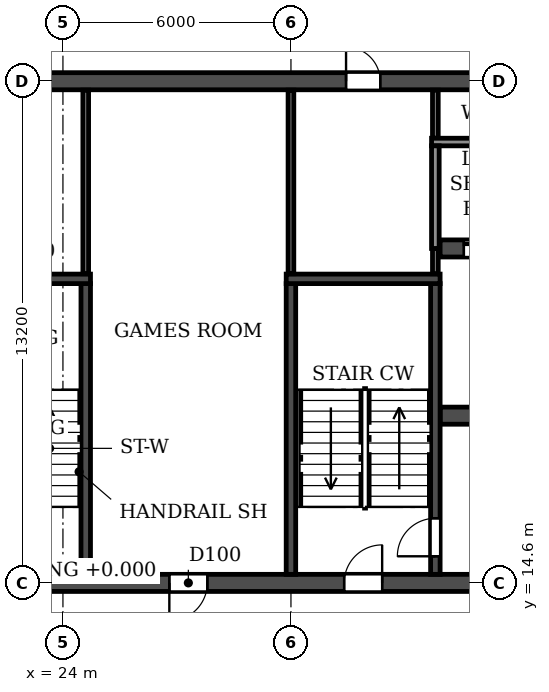
"""IFC4 building model, lengths in metres.
Left out: names, types, materials, properties, quantities, classifications, styles, units other than length and angle.
Written with IfcOpenShell. Run it as: python <this file> out.ifc"""

import sys

from ifc_helpers import new_model, si_unit, direction, frame, frame_2d, origin, place, context, subcontext, project, spatial, rectangle, extrude, element, fill, save


model = new_model("IFC4")
c1 = context("Model", 3, precision=1e-05, world=origin(), true_north=direction((0.0, 1.0)))
c2 = subcontext(c1, "Body", "Model", "MODEL_VIEW")
j1 = project(units=[si_unit("LENGTHUNIT", "METRE"), si_unit("PLANEANGLEUNIT", "RADIAN")], contexts=[c1])
p1 = place(None, origin())
s1 = spatial("IfcSite", under=j1, at=p1, CompositionType="ELEMENT")
p2 = place(p1, origin())
s2 = spatial("IfcBuilding", under=s1, at=p2, CompositionType="ELEMENT")
p3 = place(p2, frame((0.0, 0.0, 142.2)))
s3 = spatial("IfcBuildingStorey", under=s2, at=p3, CompositionType="ELEMENT", Elevation=142.2)
p4 = place(p3, frame((12.2, 14.6, 0.0), z_axis=(0.0, 0.0, 1.0), x_axis=(1.0, 0.0, 0.0)))
e1 = element("IfcWall", 1, at=p4, inside=s3, PredefinedType="SOLIDWALL", context=c2, shape_type="SweptSolid", body=[
    extrude(rectangle(XDim=77.6, YDim=0.45, at=frame_2d((38.8, 0.0))), origin(), (0.0, 0.0, 1.0), 3.07),
])
p5 = place(p4, frame((0.8, 0.0, 0.0)))
e2 = element("IfcOpeningElement", 2, at=p5, cuts=e1, PredefinedType="OPENING", context=c2, shape_type="SweptSolid", body=[
    extrude(rectangle(XDim=1.0, YDim=2.1, at=frame_2d((0.5, 1.05))), frame((0.0, 0.235, 0.0), z_axis=(0.0, -1.0, 0.0), x_axis=(1.0, 0.0, 0.0)), (0.0, 0.0, 1.0), 0.47),
])
p6 = place(p4, frame((3.8, 0.0, 0.0)))
e3 = element("IfcOpeningElement", 3, at=p6, cuts=e1, PredefinedType="OPENING", context=c2, shape_type="SweptSolid", body=[
    extrude(rectangle(XDim=1.0, YDim=2.1, at=frame_2d((0.5, 1.05))), frame((0.0, 0.235, 0.0), z_axis=(0.0, -1.0, 0.0), x_axis=(1.0, 0.0, 0.0)), (0.0, 0.0, 1.0), 0.47),
])
p7 = place(p4, frame((6.7, 0.0, 0.0)))
e4 = element("IfcOpeningElement", 4, at=p7, cuts=e1, PredefinedType="OPENING", context=c2, shape_type="SweptSolid", body=[
    extrude(rectangle(XDim=1.0, YDim=2.1, at=frame_2d((0.5, 1.05))), frame((0.0, 0.235, 0.0), z_axis=(0.0, -1.0, 0.0), x_axis=(1.0, 0.0, 0.0)), (0.0, 0.0, 1.0), 0.47),
])
p8 = place(p4, frame((14.6, 0.0, 0.0)))
e5 = element("IfcOpeningElement", 5, at=p8, cuts=e1, PredefinedType="OPENING", context=c2, shape_type="SweptSolid", body=[
    extrude(rectangle(XDim=1.0, YDim=2.1, at=frame_2d((0.5, 1.05))), frame((0.0, 0.235, 0.0), z_axis=(0.0, -1.0, 0.0), x_axis=(1.0, 0.0, 0.0)), (0.0, 0.0, 1.0), 0.47),
])
p9 = place(p4, frame((19.2, 0.0, 0.0)))
e6 = element("IfcOpeningElement", 6, at=p9, cuts=e1, PredefinedType="OPENING", context=c2, shape_type="SweptSolid", body=[
    extrude(rectangle(XDim=1.0, YDim=2.1, at=frame_2d((0.5, 1.05))), frame((0.0, 0.235, 0.0), z_axis=(0.0, -1.0, 0.0), x_axis=(1.0, 0.0, 0.0)), (0.0, 0.0, 1.0), 0.47),
])
p10 = place(p4, frame((33.1, 0.0, 0.0)))
e7 = element("IfcOpeningElement", 7, at=p10, cuts=e1, PredefinedType="OPENING", context=c2, shape_type="SweptSolid", body=[
    extrude(rectangle(XDim=1.0, YDim=2.1, at=frame_2d((0.5, 1.05))), frame((0.0, 0.235, 0.0), z_axis=(0.0, -1.0, 0.0), x_axis=(1.0, 0.0, 0.0)), (0.0, 0.0, 1.0), 0.47),
])
p11 = place(p4, frame((38.3, 0.0, 0.0)))
e8 = element("IfcOpeningElement", 8, at=p11, cuts=e1, PredefinedType="OPENING", context=c2, shape_type="SweptSolid", body=[
    extrude(rectangle(XDim=1.0, YDim=2.1, at=frame_2d((0.5, 1.05))), frame((0.0, 0.235, 0.0), z_axis=(0.0, -1.0, 0.0), x_axis=(1.0, 0.0, 0.0)), (0.0, 0.0, 1.0), 0.47),
])
p12 = place(p4, frame((40.9, 0.0, 0.0)))
e9 = element("IfcOpeningElement", 9, at=p12, cuts=e1, PredefinedType="OPENING", context=c2, shape_type="SweptSolid", body=[
    extrude(rectangle(XDim=1.0, YDim=2.1, at=frame_2d((0.5, 1.05))), frame((0.0, 0.235, 0.0), z_axis=(0.0, -1.0, 0.0), x_axis=(1.0, 0.0, 0.0)), (0.0, 0.0, 1.0), 0.47),
])
p13 = place(p4, frame((44.8, 0.0, 0.0)))
e10 = element("IfcOpeningElement", 10, at=p13, cuts=e1, PredefinedType="OPENING", context=c2, shape_type="SweptSolid", body=[
    extrude(rectangle(XDim=1.0, YDim=2.1, at=frame_2d((0.5, 1.05))), frame((0.0, 0.235, 0.0), z_axis=(0.0, -1.0, 0.0), x_axis=(1.0, 0.0, 0.0)), (0.0, 0.0, 1.0), 0.47),
])
p14 = place(p4, frame((57.4, 0.0, 0.0)))
e11 = element("IfcOpeningElement", 11, at=p14, cuts=e1, PredefinedType="OPENING", context=c2, shape_type="SweptSolid", body=[
    extrude(rectangle(XDim=1.0, YDim=2.1, at=frame_2d((0.5, 1.05))), frame((0.0, 0.235, 0.0), z_axis=(0.0, -1.0, 0.0), x_axis=(1.0, 0.0, 0.0)), (0.0, 0.0, 1.0), 0.47),
])
p15 = place(p4, frame((62.0, 0.0, 0.0)))
e12 = element("IfcOpeningElement", 12, at=p15, cuts=e1, PredefinedType="OPENING", context=c2, shape_type="SweptSolid", body=[
    extrude(rectangle(XDim=1.0, YDim=2.1, at=frame_2d((0.5, 1.05))), frame((0.0, 0.235, 0.0), z_axis=(0.0, -1.0, 0.0), x_axis=(1.0, 0.0, 0.0)), (0.0, 0.0, 1.0), 0.47),
])
p16 = place(p4, frame((69.9, 0.0, 0.0)))
e13 = element("IfcOpeningElement", 13, at=p16, cuts=e1, PredefinedType="OPENING", context=c2, shape_type="SweptSolid", body=[
    extrude(rectangle(XDim=1.0, YDim=2.1, at=frame_2d((0.5, 1.05))), frame((0.0, 0.235, 0.0), z_axis=(0.0, -1.0, 0.0), x_axis=(1.0, 0.0, 0.0)), (0.0, 0.0, 1.0), 0.47),
])
p17 = place(p4, frame((72.8, 0.0, 0.0)))
e14 = element("IfcOpeningElement", 14, at=p17, cuts=e1, PredefinedType="OPENING", context=c2, shape_type="SweptSolid", body=[
    extrude(rectangle(XDim=1.0, YDim=2.1, at=frame_2d((0.5, 1.05))), frame((0.0, 0.235, 0.0), z_axis=(0.0, -1.0, 0.0), x_axis=(1.0, 0.0, 0.0)), (0.0, 0.0, 1.0), 0.47),
])
p18 = place(p4, frame((75.8, 0.0, 0.0)))
e15 = element("IfcOpeningElement", 15, at=p18, cuts=e1, PredefinedType="OPENING", context=c2, shape_type="SweptSolid", body=[
    extrude(rectangle(XDim=1.0, YDim=2.1, at=frame_2d((0.5, 1.05))), frame((0.0, 0.235, 0.0), z_axis=(0.0, -1.0, 0.0), x_axis=(1.0, 0.0, 0.0)), (0.0, 0.0, 1.0), 0.47),
])
p19 = place(p3, frame((12.2, 27.8, 0.0), z_axis=(0.0, 0.0, 1.0), x_axis=(1.0, 0.0, 0.0)))
e16 = element("IfcWall", 16, at=p19, inside=s3, PredefinedType="SOLIDWALL", context=c2, shape_type="SweptSolid", body=[
    extrude(rectangle(XDim=77.6, YDim=0.45, at=frame_2d((38.8, 0.0))), origin(), (0.0, 0.0, 1.0), 3.07),
])
p20 = place(p19, frame((2.3, 0.0, 0.0)))
e17 = element("IfcOpeningElement", 17, at=p20, cuts=e16, PredefinedType="OPENING", context=c2, shape_type="SweptSolid", body=[
    extrude(rectangle(XDim=1.0, YDim=2.1, at=frame_2d((0.5, 1.05))), frame((0.0, 0.235, 0.0), z_axis=(0.0, -1.0, 0.0), x_axis=(1.0, 0.0, 0.0)), (0.0, 0.0, 1.0), 0.47),
])
p21 = place(p19, frame((6.7, 0.0, 0.0)))
e18 = element("IfcOpeningElement", 18, at=p21, cuts=e16, PredefinedType="OPENING", context=c2, shape_type="SweptSolid", body=[
    extrude(rectangle(XDim=1.0, YDim=2.1, at=frame_2d((0.5, 1.05))), frame((0.0, 0.235, 0.0), z_axis=(0.0, -1.0, 0.0), x_axis=(1.0, 0.0, 0.0)), (0.0, 0.0, 1.0), 0.47),
])
p22 = place(p19, frame((10.05, 0.0, 0.0)))
e19 = element("IfcOpeningElement", 19, at=p22, cuts=e16, PredefinedType="OPENING", context=c2, shape_type="SweptSolid", body=[
    extrude(rectangle(XDim=0.9, YDim=2.1, at=frame_2d((0.45, 1.05))), frame((0.0, 0.235, 0.0), z_axis=(0.0, -1.0, 0.0), x_axis=(1.0, 0.0, 0.0)), (0.0, 0.0, 1.0), 0.47),
])
p23 = place(p19, frame((19.25, 0.0, 0.0)))
e20 = element("IfcOpeningElement", 20, at=p23, cuts=e16, PredefinedType="OPENING", context=c2, shape_type="SweptSolid", body=[
    extrude(rectangle(XDim=0.9, YDim=2.1, at=frame_2d((0.45, 1.05))), frame((0.0, 0.235, 0.0), z_axis=(0.0, -1.0, 0.0), x_axis=(1.0, 0.0, 0.0)), (0.0, 0.0, 1.0), 0.47),
])
p24 = place(p19, frame((23.7, 0.0, 0.0)))
e21 = element("IfcOpeningElement", 21, at=p24, cuts=e16, PredefinedType="OPENING", context=c2, shape_type="SweptSolid", body=[
    extrude(rectangle(XDim=1.0, YDim=2.1, at=frame_2d((0.5, 1.05))), frame((0.0, 0.235, 0.0), z_axis=(0.0, -1.0, 0.0), x_axis=(1.0, 0.0, 0.0)), (0.0, 0.0, 1.0), 0.47),
])
p25 = place(p19, frame((28.9, 0.0, 0.0)))
e22 = element("IfcOpeningElement", 22, at=p25, cuts=e16, PredefinedType="OPENING", context=c2, shape_type="SweptSolid", body=[
    extrude(rectangle(XDim=1.0, YDim=2.1, at=frame_2d((0.5, 1.05))), frame((0.0, 0.235, 0.0), z_axis=(0.0, -1.0, 0.0), x_axis=(1.0, 0.0, 0.0)), (0.0, 0.0, 1.0), 0.47),
])
p26 = place(p19, frame((35.4, 0.0, 0.0)))
e23 = element("IfcOpeningElement", 23, at=p26, cuts=e16, PredefinedType="OPENING", context=c2, shape_type="SweptSolid", body=[
    extrude(rectangle(XDim=1.0, YDim=2.1, at=frame_2d((0.5, 1.05))), frame((0.0, 0.235, 0.0), z_axis=(0.0, -1.0, 0.0), x_axis=(1.0, 0.0, 0.0)), (0.0, 0.0, 1.0), 0.47),
])
p27 = place(p19, frame((38.3, 0.0, 0.0)))
e24 = element("IfcOpeningElement", 24, at=p27, cuts=e16, PredefinedType="OPENING", context=c2, shape_type="SweptSolid", body=[
    extrude(rectangle(XDim=1.0, YDim=2.1, at=frame_2d((0.5, 1.05))), frame((0.0, 0.235, 0.0), z_axis=(0.0, -1.0, 0.0), x_axis=(1.0, 0.0, 0.0)), (0.0, 0.0, 1.0), 0.47),
])
p28 = place(p19, frame((41.2, 0.0, 0.0)))
e25 = element("IfcOpeningElement", 25, at=p28, cuts=e16, PredefinedType="OPENING", context=c2, shape_type="SweptSolid", body=[
    extrude(rectangle(XDim=1.0, YDim=2.1, at=frame_2d((0.5, 1.05))), frame((0.0, 0.235, 0.0), z_axis=(0.0, -1.0, 0.0), x_axis=(1.0, 0.0, 0.0)), (0.0, 0.0, 1.0), 0.47),
])
p29 = place(p19, frame((43.8, 0.0, 0.0)))
e26 = element("IfcOpeningElement", 26, at=p29, cuts=e16, PredefinedType="OPENING", context=c2, shape_type="SweptSolid", body=[
    extrude(rectangle(XDim=1.0, YDim=2.1, at=frame_2d((0.5, 1.05))), frame((0.0, 0.235, 0.0), z_axis=(0.0, -1.0, 0.0), x_axis=(1.0, 0.0, 0.0)), (0.0, 0.0, 1.0), 0.47),
])
p30 = place(p19, frame((46.4, 0.0, 0.0)))
e27 = element("IfcOpeningElement", 27, at=p30, cuts=e16, PredefinedType="OPENING", context=c2, shape_type="SweptSolid", body=[
    extrude(rectangle(XDim=1.0, YDim=2.1, at=frame_2d((0.5, 1.05))), frame((0.0, 0.235, 0.0), z_axis=(0.0, -1.0, 0.0), x_axis=(1.0, 0.0, 0.0)), (0.0, 0.0, 1.0), 0.47),
])
p31 = place(p19, frame((49.0, 0.0, 0.0)))
e28 = element("IfcOpeningElement", 28, at=p31, cuts=e16, PredefinedType="OPENING", context=c2, shape_type="SweptSolid", body=[
    extrude(rectangle(XDim=1.0, YDim=2.1, at=frame_2d((0.5, 1.05))), frame((0.0, 0.235, 0.0), z_axis=(0.0, -1.0, 0.0), x_axis=(1.0, 0.0, 0.0)), (0.0, 0.0, 1.0), 0.47),
])
p32 = place(p19, frame((52.9, 0.0, 0.0)))
e29 = element("IfcOpeningElement", 29, at=p32, cuts=e16, PredefinedType="OPENING", context=c2, shape_type="SweptSolid", body=[
    extrude(rectangle(XDim=1.0, YDim=2.1, at=frame_2d((0.5, 1.05))), frame((0.0, 0.235, 0.0), z_axis=(0.0, -1.0, 0.0), x_axis=(1.0, 0.0, 0.0)), (0.0, 0.0, 1.0), 0.47),
])
p33 = place(p19, frame((57.45, 0.0, 0.0)))
e30 = element("IfcOpeningElement", 30, at=p33, cuts=e16, PredefinedType="OPENING", context=c2, shape_type="SweptSolid", body=[
    extrude(rectangle(XDim=0.9, YDim=2.1, at=frame_2d((0.45, 1.05))), frame((0.0, 0.235, 0.0), z_axis=(0.0, -1.0, 0.0), x_axis=(1.0, 0.0, 0.0)), (0.0, 0.0, 1.0), 0.47),
])
p34 = place(p19, frame((66.65, 0.0, 0.0)))
e31 = element("IfcOpeningElement", 31, at=p34, cuts=e16, PredefinedType="OPENING", context=c2, shape_type="SweptSolid", body=[
    extrude(rectangle(XDim=0.9, YDim=2.1, at=frame_2d((0.45, 1.05))), frame((0.0, 0.235, 0.0), z_axis=(0.0, -1.0, 0.0), x_axis=(1.0, 0.0, 0.0)), (0.0, 0.0, 1.0), 0.47),
])
p35 = place(p19, frame((69.9, 0.0, 0.0)))
e32 = element("IfcOpeningElement", 32, at=p35, cuts=e16, PredefinedType="OPENING", context=c2, shape_type="SweptSolid", body=[
    extrude(rectangle(XDim=1.0, YDim=2.1, at=frame_2d((0.5, 1.05))), frame((0.0, 0.235, 0.0), z_axis=(0.0, -1.0, 0.0), x_axis=(1.0, 0.0, 0.0)), (0.0, 0.0, 1.0), 0.47),
])
p36 = place(p19, frame((74.3, 0.0, 0.0)))
e33 = element("IfcOpeningElement", 33, at=p36, cuts=e16, PredefinedType="OPENING", context=c2, shape_type="SweptSolid", body=[
    extrude(rectangle(XDim=1.0, YDim=2.1, at=frame_2d((0.5, 1.05))), frame((0.0, 0.235, 0.0), z_axis=(0.0, -1.0, 0.0), x_axis=(1.0, 0.0, 0.0)), (0.0, 0.0, 1.0), 0.47),
])
p37 = place(p3, frame((33.925, 19.0, 0.0), z_axis=(0.0, 0.0, 1.0), x_axis=(1.0, 0.0, 0.0)))
e34 = element("IfcWall", 34, at=p37, inside=s3, PredefinedType="SOLIDWALL", context=c2, shape_type="SweptSolid", body=[
    extrude(rectangle(XDim=34.15, YDim=0.45, at=frame_2d((17.075, 0.0))), origin(), (0.0, 0.0, 1.0), 3.07),
])
p38 = place(p37, frame((16.175, 0.0, 0.0)))
e35 = element("IfcOpeningElement", 35, at=p38, cuts=e34, PredefinedType="OPENING", context=c2, shape_type="SweptSolid", body=[
    extrude(rectangle(XDim=1.8, YDim=2.1, at=frame_2d((0.9, 1.05))), frame((0.0, 0.235, 0.0), z_axis=(0.0, -1.0, 0.0), x_axis=(1.0, 0.0, 0.0)), (0.0, 0.0, 1.0), 0.47),
])
p39 = place(p37, frame((1.525, 0.0, 0.0)))
e36 = element("IfcOpeningElement", 36, at=p39, cuts=e34, PredefinedType="OPENING", context=c2, shape_type="SweptSolid", body=[
    extrude(rectangle(XDim=1.8, YDim=2.1, at=frame_2d((0.9, 1.05))), frame((0.0, 0.235, 0.0), z_axis=(0.0, -1.0, 0.0), x_axis=(1.0, 0.0, 0.0)), (0.0, 0.0, 1.0), 0.47),
])
p40 = place(p37, frame((30.825, 0.0, 0.0)))
e37 = element("IfcOpeningElement", 37, at=p40, cuts=e34, PredefinedType="OPENING", context=c2, shape_type="SweptSolid", body=[
    extrude(rectangle(XDim=1.8, YDim=2.1, at=frame_2d((0.9, 1.05))), frame((0.0, 0.235, 0.0), z_axis=(0.0, -1.0, 0.0), x_axis=(1.0, 0.0, 0.0)), (0.0, 0.0, 1.0), 0.47),
])
p41 = place(p3, frame((33.925, 23.4, 0.0), z_axis=(0.0, 0.0, 1.0), x_axis=(1.0, 0.0, 0.0)))
e38 = element("IfcWall", 38, at=p41, inside=s3, PredefinedType="SOLIDWALL", context=c2, shape_type="SweptSolid", body=[
    extrude(rectangle(XDim=34.15, YDim=0.45, at=frame_2d((17.075, 0.0))), origin(), (0.0, 0.0, 1.0), 3.07),
])
p42 = place(p41, frame((16.175, 0.0, 0.0)))
e39 = element("IfcOpeningElement", 39, at=p42, cuts=e38, PredefinedType="OPENING", context=c2, shape_type="SweptSolid", body=[
    extrude(rectangle(XDim=1.8, YDim=2.1, at=frame_2d((0.9, 1.05))), frame((0.0, 0.235, 0.0), z_axis=(0.0, -1.0, 0.0), x_axis=(1.0, 0.0, 0.0)), (0.0, 0.0, 1.0), 0.47),
])
p43 = place(p41, frame((0.625, 0.0, 0.0)))
e40 = element("IfcOpeningElement", 40, at=p43, cuts=e38, PredefinedType="OPENING", context=c2, shape_type="SweptSolid", body=[
    extrude(rectangle(XDim=1.1, YDim=2.1, at=frame_2d((0.55, 1.05))), frame((0.0, 0.235, 0.0), z_axis=(0.0, -1.0, 0.0), x_axis=(1.0, 0.0, 0.0)), (0.0, 0.0, 1.0), 0.47),
])
p44 = place(p41, frame((3.225, 0.0, 0.0)))
e41 = element("IfcOpeningElement", 41, at=p44, cuts=e38, PredefinedType="OPENING", context=c2, shape_type="SweptSolid", body=[
    extrude(rectangle(XDim=1.1, YDim=2.1, at=frame_2d((0.55, 1.05))), frame((0.0, 0.235, 0.0), z_axis=(0.0, -1.0, 0.0), x_axis=(1.0, 0.0, 0.0)), (0.0, 0.0, 1.0), 0.47),
])
p45 = place(p41, frame((5.825, 0.0, 0.0)))
e42 = element("IfcOpeningElement", 42, at=p45, cuts=e38, PredefinedType="OPENING", context=c2, shape_type="SweptSolid", body=[
    extrude(rectangle(XDim=1.1, YDim=2.1, at=frame_2d((0.55, 1.05))), frame((0.0, 0.235, 0.0), z_axis=(0.0, -1.0, 0.0), x_axis=(1.0, 0.0, 0.0)), (0.0, 0.0, 1.0), 0.47),
])
p46 = place(p41, frame((8.425, 0.0, 0.0)))
e43 = element("IfcOpeningElement", 43, at=p46, cuts=e38, PredefinedType="OPENING", context=c2, shape_type="SweptSolid", body=[
    extrude(rectangle(XDim=1.1, YDim=2.1, at=frame_2d((0.55, 1.05))), frame((0.0, 0.235, 0.0), z_axis=(0.0, -1.0, 0.0), x_axis=(1.0, 0.0, 0.0)), (0.0, 0.0, 1.0), 0.47),
])
p47 = place(p41, frame((11.025, 0.0, 0.0)))
e44 = element("IfcOpeningElement", 44, at=p47, cuts=e38, PredefinedType="OPENING", context=c2, shape_type="SweptSolid", body=[
    extrude(rectangle(XDim=1.1, YDim=2.1, at=frame_2d((0.55, 1.05))), frame((0.0, 0.235, 0.0), z_axis=(0.0, -1.0, 0.0), x_axis=(1.0, 0.0, 0.0)), (0.0, 0.0, 1.0), 0.47),
])
p48 = place(p41, frame((13.625, 0.0, 0.0)))
e45 = element("IfcOpeningElement", 45, at=p48, cuts=e38, PredefinedType="OPENING", context=c2, shape_type="SweptSolid", body=[
    extrude(rectangle(XDim=1.1, YDim=2.1, at=frame_2d((0.55, 1.05))), frame((0.0, 0.235, 0.0), z_axis=(0.0, -1.0, 0.0), x_axis=(1.0, 0.0, 0.0)), (0.0, 0.0, 1.0), 0.47),
])
p49 = place(p41, frame((27.225, 0.0, 0.0)))
e46 = element("IfcOpeningElement", 46, at=p49, cuts=e38, PredefinedType="OPENING", context=c2, shape_type="SweptSolid", body=[
    extrude(rectangle(XDim=1.1, YDim=2.1, at=frame_2d((0.55, 1.05))), frame((0.0, 0.235, 0.0), z_axis=(0.0, -1.0, 0.0), x_axis=(1.0, 0.0, 0.0)), (0.0, 0.0, 1.0), 0.47),
])
p50 = place(p3, frame((30.0, 14.825, 0.0), z_axis=(0.0, 0.0, 1.0), x_axis=(0.0, 1.0, 0.0)))
e47 = element("IfcWall", 47, at=p50, inside=s3, PredefinedType="SOLIDWALL", context=c2, shape_type="SweptSolid", body=[
    extrude(rectangle(XDim=7.65, YDim=0.25, at=frame_2d((3.825, 0.0))), origin(), (0.0, 0.0, 1.0), 3.07),
])
p51 = place(p3, frame((33.8, 14.825, 0.0), z_axis=(0.0, 0.0, 1.0), x_axis=(0.0, 1.0, 0.0)))
e48 = element("IfcWall", 48, at=p51, inside=s3, PredefinedType="SOLIDWALL", context=c2, shape_type="SweptSolid", body=[
    extrude(rectangle(XDim=7.65, YDim=0.25, at=frame_2d((3.825, 0.0))), origin(), (0.0, 0.0, 1.0), 3.07),
])
p52 = place(p51, frame((0.475, 0.0, 0.0)))
e49 = element("IfcOpeningElement", 49, at=p52, cuts=e48, PredefinedType="OPENING", context=c2, shape_type="SweptSolid", body=[
    extrude(rectangle(XDim=1.0, YDim=2.1, at=frame_2d((0.5, 1.05))), frame((0.0, 0.135, 0.0), z_axis=(0.0, -1.0, 0.0), x_axis=(1.0, 0.0, 0.0)), (0.0, 0.0, 1.0), 0.27),
])
p53 = place(p3, frame((29.875, 22.6, 0.0), z_axis=(0.0, 0.0, 1.0), x_axis=(1.0, 0.0, 0.0)))
e50 = element("IfcWall", 50, at=p53, inside=s3, PredefinedType="SOLIDWALL", context=c2, shape_type="SweptSolid", body=[
    extrude(rectangle(XDim=4.05, YDim=0.25, at=frame_2d((2.025, 0.0))), origin(), (0.0, 0.0, 1.0), 3.07),
])
p54 = place(p3, frame((24.6, 14.825, 0.0), z_axis=(0.0, 0.0, 1.0), x_axis=(0.0, 1.0, 0.0)))
e51 = element("IfcWall", 51, at=p54, inside=s3, PredefinedType="SOLIDWALL", context=c2, shape_type="SweptSolid", body=[
    extrude(rectangle(XDim=7.65, YDim=0.25, at=frame_2d((3.825, 0.0))), origin(), (0.0, 0.0, 1.0), 3.07),
])
p55 = place(p3, frame((20.675, 22.6, 0.0), z_axis=(0.0, 0.0, 1.0), x_axis=(1.0, 0.0, 0.0)))
e52 = element("IfcWall", 52, at=p55, inside=s3, PredefinedType="SOLIDWALL", context=c2, shape_type="SweptSolid", body=[
    extrude(rectangle(XDim=4.05, YDim=0.25, at=frame_2d((2.025, 0.0))), origin(), (0.0, 0.0, 1.0), 3.07),
])
for number, where, z_axis, x_axis in (
    (53, (24.6, 22.735, 0.0), (0.0, 0.0, 1.0), (0.0, 1.0, 0.0)),
    (54, (30.0, 22.735, 0.0), (0.0, 0.0, 1.0), (0.0, 1.0, 0.0)),
):
    element("IfcWall", number, at=place(p3, frame(where, z_axis=z_axis, x_axis=x_axis)), inside=s3, PredefinedType="PARTITIONING", context=c2, shape_type="SweptSolid", body=[
        extrude(rectangle(XDim=4.83, YDim=0.15, at=frame_2d((2.415, 0.0))), origin(), (0.0, 0.0, 1.0), 3.07),
    ])
p56 = place(p3, frame((33.8, 22.735, 0.0), z_axis=(0.0, 0.0, 1.0), x_axis=(0.0, 1.0, 0.0)))
e55 = element("IfcWall", 55, at=p56, inside=s3, PredefinedType="PARTITIONING", context=c2, shape_type="SweptSolid", body=[
    extrude(rectangle(XDim=0.665, YDim=0.15, at=frame_2d((0.333, 0.0))), origin(), (0.0, 0.0, 1.0), 3.07),
])
p57 = place(p3, frame((33.8, 26.3, 0.0), z_axis=(0.0, 0.0, 1.0), x_axis=(0.0, 1.0, 0.0)))
e56 = element("IfcWall", 56, at=p57, inside=s3, PredefinedType="PARTITIONING", context=c2, shape_type="SweptSolid", body=[
    extrude(rectangle(XDim=1.265, YDim=0.15, at=frame_2d((0.632, 0.0))), origin(), (0.0, 0.0, 1.0), 3.07),
])
p58 = place(p3, frame((33.7, 26.2, 0.0), z_axis=(0.0, 0.0, 1.0), x_axis=(1.0, 0.0, 0.0)))
e57 = element("IfcWall", 57, at=p58, inside=s3, PredefinedType="PARTITIONING", context=c2, shape_type="SweptSolid", body=[
    extrude(rectangle(XDim=10.4, YDim=0.2, at=frame_2d((5.2, 0.0))), origin(), (0.0, 0.0, 1.0), 3.07),
])
p59 = place(p3, frame((33.8, 23.4, 0.0), z_axis=(0.0, 0.0, 1.0), x_axis=(0.0, 1.0, 0.0)))
e58 = element("IfcWall", 58, at=p59, inside=s3, PredefinedType="PARTITIONING", context=c2, shape_type="SweptSolid", body=[
    extrude(rectangle(XDim=2.7, YDim=0.2, at=frame_2d((1.35, 0.0))), origin(), (0.0, 0.0, 1.0), 3.07),
])
p60 = place(p23, origin())
e59 = element("IfcDoor", 59, at=p60, inside=s3, OperationType="SINGLE_SWING_LEFT", PredefinedType="DOOR", context=c2, shape_type="SweptSolid", body=[
    extrude(rectangle(XDim=0.9, YDim=2.1, at=frame_2d((0.45, 1.05))), frame((0.0, 0.025, 0.0), z_axis=(0.0, -1.0, 0.0), x_axis=(1.0, 0.0, 0.0)), (0.0, 0.0, 1.0), 0.05),
])
fill(e20, e59)
p61 = place(p8, frame((1.0, 0.0, 0.0), z_axis=(0.0, 0.0, 1.0), x_axis=(-1.0, 0.0, 0.0)))
e60 = element("IfcDoor", 60, at=p61, inside=s3, OperationType="SINGLE_SWING_RIGHT", PredefinedType="DOOR", context=c2, shape_type="SweptSolid", body=[
    extrude(rectangle(XDim=1.0, YDim=2.1, at=frame_2d((0.5, 1.05))), frame((0.0, 0.025, 0.0), z_axis=(0.0, -1.0, 0.0), x_axis=(1.0, 0.0, 0.0)), (0.0, 0.0, 1.0), 0.05),
])
fill(e5, e60)
p62 = place(p9, origin())
e61 = element("IfcDoor", 61, at=p62, inside=s3, OperationType="SINGLE_SWING_RIGHT", PredefinedType="DOOR", context=c2, shape_type="SweptSolid", body=[
    extrude(rectangle(XDim=1.0, YDim=2.1, at=frame_2d((0.5, 1.05))), frame((0.0, 0.025, 0.0), z_axis=(0.0, -1.0, 0.0), x_axis=(1.0, 0.0, 0.0)), (0.0, 0.0, 1.0), 0.05),
])
fill(e6, e61)
p63 = place(p52, origin())
e62 = element("IfcDoor", 62, at=p63, inside=s3, OperationType="SINGLE_SWING_LEFT", PredefinedType="DOOR", context=c2, shape_type="SweptSolid", body=[
    extrude(rectangle(XDim=1.0, YDim=2.1, at=frame_2d((0.5, 1.05))), frame((0.0, 0.025, 0.0), z_axis=(0.0, -1.0, 0.0), x_axis=(1.0, 0.0, 0.0)), (0.0, 0.0, 1.0), 0.05),
])
fill(e49, e62)
p64 = place(p43, origin())
e63 = element("IfcDoor", 63, at=p64, inside=s3, OperationType="DOUBLE_DOOR_SLIDING", PredefinedType="DOOR", context=c2, shape_type="SweptSolid", body=[
    extrude(rectangle(XDim=1.1, YDim=2.1, at=frame_2d((0.55, 1.05))), frame((0.0, 0.025, 0.0), z_axis=(0.0, -1.0, 0.0), x_axis=(1.0, 0.0, 0.0)), (0.0, 0.0, 1.0), 0.05),
])
fill(e40, e63)
save(model, sys.argv[1])
